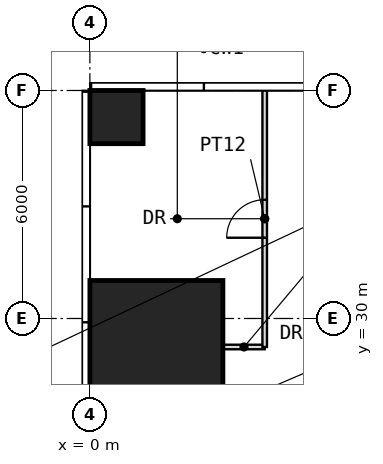
"""IFC4 building model, lengths in metres.
Left out: names, types, materials, properties, quantities, classifications, styles, units other than length and angle.
Written with IfcOpenShell. Run it as: python <this file> out.ifc"""

import sys

from ifc_helpers import new_model, si_unit, direction, frame, frame_2d, origin, origin_2d, place, context, subcontext, project, spatial, rectangle, extrude, element, fill, save


model = new_model("IFC4")
c1 = context("Model", 3, precision=1e-05, world=origin(), true_north=direction((0.0, 1.0)))
c2 = subcontext(c1, "Body", "Model", "MODEL_VIEW")
j1 = project(units=[si_unit("LENGTHUNIT", "METRE"), si_unit("PLANEANGLEUNIT", "RADIAN")], contexts=[c1])
p1 = place(None, origin())
s1 = spatial("IfcSite", under=j1, at=p1, CompositionType="ELEMENT")
p2 = place(p1, origin())
s2 = spatial("IfcBuilding", under=s1, at=p2, CompositionType="ELEMENT")
p3 = place(p2, frame((0.0, 0.0, 30.5)))
s3 = spatial("IfcBuildingStorey", under=s2, at=p3, CompositionType="ELEMENT", Elevation=30.5)
p4 = place(p3, frame((1.75, 29.25, 0.0), z_axis=(0.0, 0.0, 1.0), x_axis=(1.0, 0.0, 0.0)))
e1 = element("IfcColumn", 1, at=p4, inside=s3, PredefinedType="COLUMN", context=c2, shape_type="SweptSolid", body=[
    extrude(rectangle(XDim=3.5, YDim=3.5, at=origin_2d()), origin(), (0.0, 0.0, 1.0), 4.0),
])
p5 = place(p3, frame((0.7, 35.3, 0.0), z_axis=(0.0, 0.0, 1.0), x_axis=(1.0, 0.0, 0.0)))
e2 = element("IfcColumn", 2, at=p5, inside=s3, PredefinedType="COLUMN", context=c2, shape_type="SweptSolid", body=[
    extrude(rectangle(XDim=1.4, YDim=1.4, at=origin_2d()), origin(), (0.0, 0.0, 1.0), 4.0),
])
p6 = place(p3, frame((3.51, 29.25, 0.0), z_axis=(0.0, 0.0, 1.0), x_axis=(1.0, 0.0, 0.0)))
e3 = element("IfcWall", 3, at=p6, inside=s3, PredefinedType="PARTITIONING", context=c2, shape_type="SweptSolid", body=[
    extrude(rectangle(XDim=1.09, YDim=0.12, at=frame_2d((0.545, 0.0))), origin(), (0.0, 0.0, 1.0), 3.75),
])
p7 = place(p3, frame((4.6, 29.25, 0.0), z_axis=(0.0, 0.0, 1.0), x_axis=(0.0, 1.0, 0.0)))
e4 = element("IfcWall", 4, at=p7, inside=s3, PredefinedType="PARTITIONING", context=c2, shape_type="SweptSolid", body=[
    extrude(rectangle(XDim=6.75, YDim=0.12, at=frame_2d((3.375, 0.0))), origin(), (0.0, 0.0, 1.0), 3.75),
])
p8 = place(p7, frame((2.875, 0.0, 0.0)))
e5 = element("IfcOpeningElement", 5, at=p8, cuts=e4, PredefinedType="OPENING", context=c2, shape_type="SweptSolid", body=[
    extrude(rectangle(XDim=1.0, YDim=2.2, at=frame_2d((0.5, 1.1))), frame((0.0, 0.07, 0.0), z_axis=(0.0, -1.0, 0.0), x_axis=(1.0, 0.0, 0.0)), (0.0, 0.0, 1.0), 0.14),
])
p9 = place(p8, origin())
e6 = element("IfcDoor", 6, at=p9, inside=s3, OperationType="SINGLE_SWING_LEFT", PredefinedType="DOOR", context=c2, shape_type="SweptSolid", body=[
    extrude(rectangle(XDim=1.0, YDim=2.2, at=frame_2d((0.5, 1.1))), frame((0.0, 0.025, 0.0), z_axis=(0.0, -1.0, 0.0), x_axis=(1.0, 0.0, 0.0)), (0.0, 0.0, 1.0), 0.05),
])
fill(e5, e6)
save(model, sys.argv[1])
